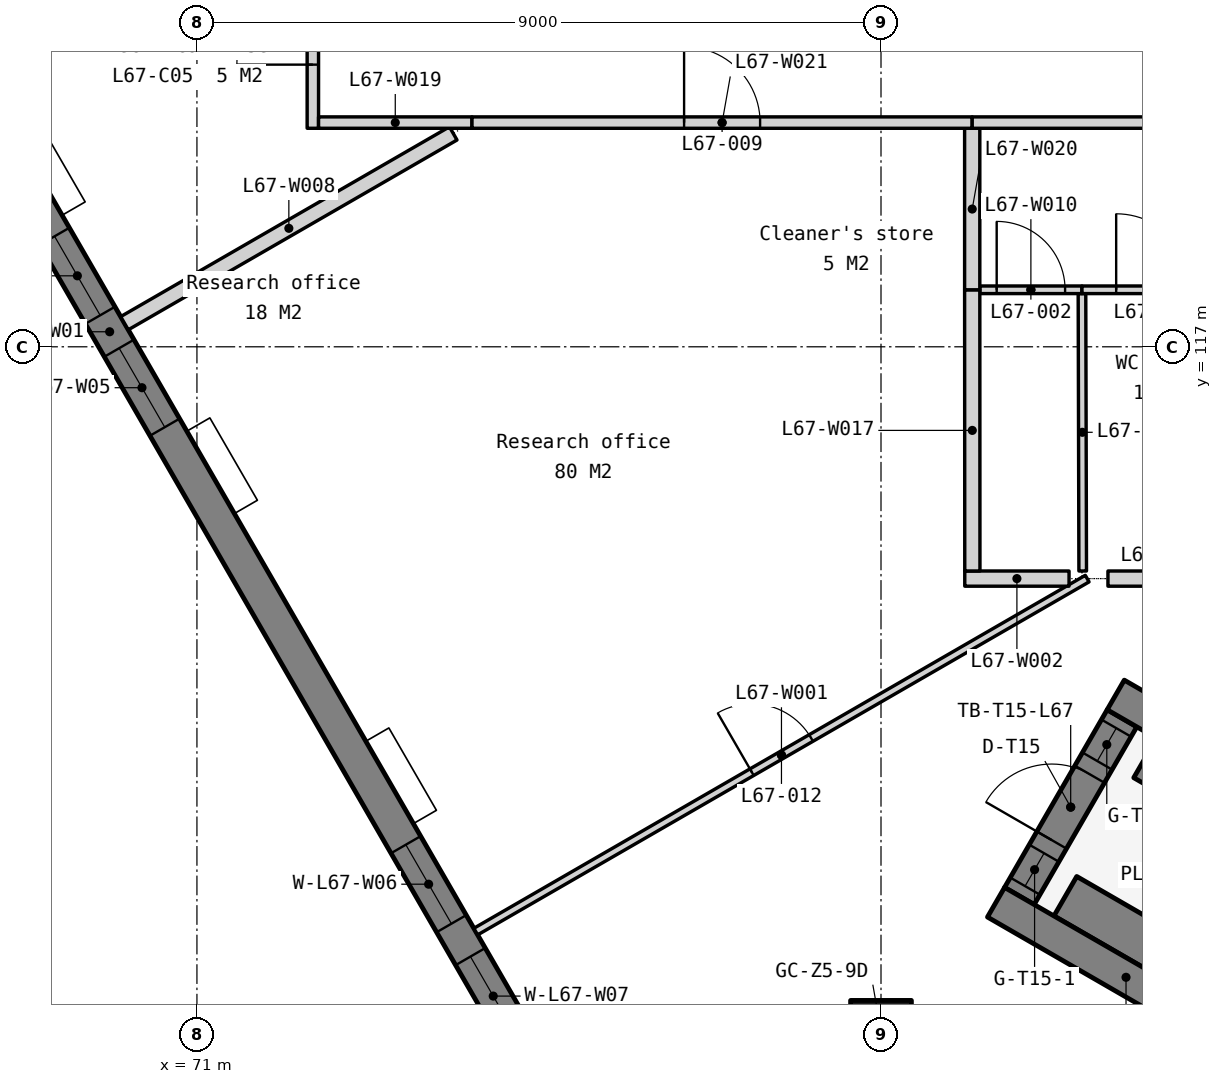
"""IFC4 building model, lengths in metres.
Left out: names, types, materials, properties, quantities, classifications, styles, units other than length and angle.
Written with IfcOpenShell. Run it as: python <this file> out.ifc"""

import sys

from ifc_helpers import new_model, si_unit, direction, frame, frame_2d, origin, origin_2d, place, context, subcontext, project, spatial, polyline, rectangle, outline, extrude, element, fill, save


model = new_model("IFC4")
c1 = context("Model", 3, precision=1e-05, world=origin(), true_north=direction((0.0, 1.0)))
c2 = subcontext(c1, "Body", "Model", "MODEL_VIEW")
j1 = project(units=[si_unit("LENGTHUNIT", "METRE"), si_unit("PLANEANGLEUNIT", "RADIAN")], contexts=[c1])
p1 = place(None, origin())
s1 = spatial("IfcSite", under=j1, at=p1, CompositionType="ELEMENT")
p2 = place(p1, origin())
s2 = spatial("IfcBuilding", under=s1, at=p2, CompositionType="ELEMENT")
p3 = place(p2, frame((0.0, 0.0, 273.8)))
s3 = spatial("IfcBuildingStorey", under=s2, at=p3, CompositionType="ELEMENT", Elevation=273.8)
p4 = place(p3, frame((80.0, 108.0, 0.0), z_axis=(0.0, 0.0, 1.0), x_axis=(1.0, 0.0, 0.0)))
e1 = element("IfcColumn", 1, at=p4, inside=s3, PredefinedType="COLUMN", context=c2, shape_type="SweptSolid", body=[
    extrude(rectangle(XDim=0.8, YDim=0.8, at=origin_2d()), origin(), (0.0, 0.0, 1.0), 3.9),
])
p5 = place(p3, frame((60.609, 133.207, -0.15), z_axis=(0.0, 0.0, 1.0), x_axis=(0.500002536638, -0.866023939251, 0.0)))
e2 = element("IfcWall", 2, at=p5, inside=s3, PredefinedType="SOLIDWALL", context=c2, shape_type="SweptSolid", body=[
    extrude(outline(polyline([(36.972, 0.0), (36.972, 3.9), (0.0, 3.9), (0.0, 0.0), (36.972, 0.0)])), frame((0.0, 0.225, 0.0), z_axis=(0.0, -1.0, 0.0), x_axis=(1.0, 0.0, 0.0)), (0.0, 0.0, 1.0), 0.45),
])
p6 = place(p5, frame((0.715, 0.0, 0.95)))
e3 = element("IfcOpeningElement", 3, at=p6, cuts=e2, PredefinedType="OPENING", context=c2, shape_type="SweptSolid", body=[
    extrude(rectangle(XDim=1.2, YDim=2.2, at=frame_2d((0.6, 1.1))), frame((0.0, 0.235, 0.0), z_axis=(0.0, -1.0, 0.0), x_axis=(1.0, 0.0, 0.0)), (0.0, 0.0, 1.0), 0.47),
])
p7 = place(p5, frame((7.793, 0.0, 0.95)))
e4 = element("IfcOpeningElement", 4, at=p7, cuts=e2, PredefinedType="OPENING", context=c2, shape_type="SweptSolid", body=[
    extrude(rectangle(XDim=1.2, YDim=2.2, at=frame_2d((0.6, 1.1))), frame((0.0, 0.235, 0.0), z_axis=(0.0, -1.0, 0.0), x_axis=(1.0, 0.0, 0.0)), (0.0, 0.0, 1.0), 0.47),
])
p8 = place(p5, frame((9.493, 0.0, 0.95)))
e5 = element("IfcOpeningElement", 5, at=p8, cuts=e2, PredefinedType="OPENING", context=c2, shape_type="SweptSolid", body=[
    extrude(rectangle(XDim=1.2, YDim=2.2, at=frame_2d((0.6, 1.1))), frame((0.0, 0.235, 0.0), z_axis=(0.0, -1.0, 0.0), x_axis=(1.0, 0.0, 0.0)), (0.0, 0.0, 1.0), 0.47),
])
p9 = place(p5, frame((17.036, 0.0, 0.95)))
e6 = element("IfcOpeningElement", 6, at=p9, cuts=e2, PredefinedType="OPENING", context=c2, shape_type="SweptSolid", body=[
    extrude(rectangle(XDim=1.2, YDim=2.2, at=frame_2d((0.6, 1.1))), frame((0.0, 0.235, 0.0), z_axis=(0.0, -1.0, 0.0), x_axis=(1.0, 0.0, 0.0)), (0.0, 0.0, 1.0), 0.47),
])
p10 = place(p5, frame((18.736, 0.0, 0.95)))
e7 = element("IfcOpeningElement", 7, at=p10, cuts=e2, PredefinedType="OPENING", context=c2, shape_type="SweptSolid", body=[
    extrude(rectangle(XDim=1.2, YDim=2.2, at=frame_2d((0.6, 1.1))), frame((0.0, 0.235, 0.0), z_axis=(0.0, -1.0, 0.0), x_axis=(1.0, 0.0, 0.0)), (0.0, 0.0, 1.0), 0.47),
])
p11 = place(p5, frame((26.279, 0.0, 0.95)))
e8 = element("IfcOpeningElement", 8, at=p11, cuts=e2, PredefinedType="OPENING", context=c2, shape_type="SweptSolid", body=[
    extrude(rectangle(XDim=1.2, YDim=2.2, at=frame_2d((0.6, 1.1))), frame((0.0, 0.235, 0.0), z_axis=(0.0, -1.0, 0.0), x_axis=(1.0, 0.0, 0.0)), (0.0, 0.0, 1.0), 0.47),
])
p12 = place(p5, frame((27.979, 0.0, 0.95)))
e9 = element("IfcOpeningElement", 9, at=p12, cuts=e2, PredefinedType="OPENING", context=c2, shape_type="SweptSolid", body=[
    extrude(rectangle(XDim=1.2, YDim=2.2, at=frame_2d((0.6, 1.1))), frame((0.0, 0.235, 0.0), z_axis=(0.0, -1.0, 0.0), x_axis=(1.0, 0.0, 0.0)), (0.0, 0.0, 1.0), 0.47),
])
p13 = place(p5, frame((35.058, 0.0, 0.95)))
e10 = element("IfcOpeningElement", 10, at=p13, cuts=e2, PredefinedType="OPENING", context=c2, shape_type="SweptSolid", body=[
    extrude(rectangle(XDim=1.2, YDim=2.2, at=frame_2d((0.6, 1.1))), frame((0.0, 0.235, 0.0), z_axis=(0.0, -1.0, 0.0), x_axis=(1.0, 0.0, 0.0)), (0.0, 0.0, 1.0), 0.47),
])
p14 = place(p3, frame((84.934, 107.717, 0.0), z_axis=(0.0, 0.0, 1.0), x_axis=(-0.866020906874, 0.500007788796, 0.0)))
e11 = element("IfcWall", 11, at=p14, inside=s3, PredefinedType="SOLIDWALL", context=c2, shape_type="SweptSolid", body=[
    extrude(rectangle(XDim=3.95, YDim=0.45, at=frame_2d((1.975, 0.0))), origin(), (0.0, 0.0, 1.0), 7.65),
])
p15 = place(p3, frame((86.509, 110.445, 0.0), z_axis=(0.0, 0.0, 1.0), x_axis=(-0.866047669374, 0.499961432884, 0.0)))
e12 = element("IfcWall", 12, at=p15, inside=s3, PredefinedType="SOLIDWALL", context=c2, shape_type="SweptSolid", body=[
    extrude(rectangle(XDim=3.95, YDim=0.45, at=frame_2d((1.975, 0.0))), origin(), (0.0, 0.0, 1.0), 7.65),
])
p16 = place(p3, frame((81.821, 109.774, -0.15), z_axis=(0.0, 0.0, 1.0), x_axis=(0.500048589285, 0.86599734893, 0.0)))
e13 = element("IfcWall", 13, at=p16, inside=s3, PredefinedType="SOLIDWALL", context=c2, shape_type="SweptSolid", body=[
    extrude(rectangle(XDim=2.7, YDim=0.45, at=frame_2d((1.35, 0.0))), origin(), (0.0, 0.0, 1.0), 3.9),
])
p17 = place(p16, frame((0.85, 0.0, 0.15)))
e14 = element("IfcOpeningElement", 14, at=p17, cuts=e13, PredefinedType="OPENING", context=c2, shape_type="SweptSolid", body=[
    extrude(rectangle(XDim=1.0, YDim=2.4, at=frame_2d((0.5, 1.2))), frame((0.0, 0.235, 0.0), z_axis=(0.0, -1.0, 0.0), x_axis=(1.0, 0.0, 0.0)), (0.0, 0.0, 1.0), 0.47),
])
p18 = place(p16, frame((0.15, 0.0, 0.15)))
e15 = element("IfcOpeningElement", 15, at=p18, cuts=e13, PredefinedType="OPENING", context=c2, shape_type="SweptSolid", body=[
    extrude(rectangle(XDim=0.5, YDim=2.4, at=frame_2d((0.25, 1.2))), frame((0.0, 0.235, 0.0), z_axis=(0.0, -1.0, 0.0), x_axis=(1.0, 0.0, 0.0)), (0.0, 0.0, 1.0), 0.47),
])
p19 = place(p16, frame((2.05, 0.0, 0.15)))
e16 = element("IfcOpeningElement", 16, at=p19, cuts=e13, PredefinedType="OPENING", context=c2, shape_type="SweptSolid", body=[
    extrude(rectangle(XDim=0.5, YDim=2.4, at=frame_2d((0.25, 1.2))), frame((0.0, 0.235, 0.0), z_axis=(0.0, -1.0, 0.0), x_axis=(1.0, 0.0, 0.0)), (0.0, 0.0, 1.0), 0.47),
])
for number, where, z_axis, x_axis in (
    (17, (84.763, 108.421, 0.0), (0.0, 0.0, 1.0), (-0.866, 0.5, 0.0)),
    (18, (85.813, 110.24, 0.0), (0.0, 0.0, 1.0), (-0.866, 0.5, 0.0)),
):
    element("IfcWall", number, at=place(p3, frame(where, z_axis=z_axis, x_axis=x_axis)), inside=s3, PredefinedType="STANDARD", context=c2, shape_type="SweptSolid", body=[
        extrude(rectangle(XDim=2.7, YDim=0.6, at=frame_2d((1.35, 0.0))), origin(), (0.0, 0.0, 1.0), 0.6),
    ])
p20 = place(p3, frame((74.668, 109.305, 0.0), z_axis=(0.0, 0.0, 1.0), x_axis=(0.866021891294, 0.500006083763, 0.0)))
e19 = element("IfcWall", 19, at=p20, inside=s3, PredefinedType="PARTITIONING", context=c2, shape_type="SweptSolid", body=[
    extrude(rectangle(XDim=9.289, YDim=0.1, at=frame_2d((4.645, 0.0))), origin(), (0.0, 0.0, 1.0), 3.75),
])
p21 = place(p20, frame((4.195, 0.0, 0.0)))
e20 = element("IfcOpeningElement", 20, at=p21, cuts=e19, PredefinedType="OPENING", context=c2, shape_type="SweptSolid", body=[
    extrude(rectangle(XDim=0.9, YDim=2.1, at=frame_2d((0.45, 1.05))), frame((0.0, 0.06, 0.0), z_axis=(0.0, -1.0, 0.0), x_axis=(1.0, 0.0, 0.0)), (0.0, 0.0, 1.0), 0.12),
])
p22 = place(p3, frame((81.102, 113.95, 0.0), z_axis=(0.0, 0.0, 1.0), x_axis=(1.0, 0.0, 0.0)))
e21 = element("IfcWall", 21, at=p22, inside=s3, PredefinedType="PARTITIONING", context=c2, shape_type="SweptSolid", body=[
    extrude(rectangle(XDim=1.372, YDim=0.2, at=frame_2d((0.686, 0.0))), origin(), (0.0, 0.0, 1.0), 3.75),
])
p23 = place(p3, frame((82.986, 113.95, 0.0), z_axis=(0.0, 0.0, 1.0), x_axis=(1.0, 0.0, 0.0)))
e22 = element("IfcWall", 22, at=p23, inside=s3, PredefinedType="PARTITIONING", context=c2, shape_type="SweptSolid", body=[
    extrude(rectangle(XDim=1.548, YDim=0.2, at=frame_2d((0.774, 0.0))), origin(), (0.0, 0.0, 1.0), 3.75),
])
p24 = place(p3, frame((70.047, 117.31, 0.0), z_axis=(0.0, 0.0, 1.0), x_axis=(0.866032544947, 0.499987630939, 0.0)))
e23 = element("IfcWall", 23, at=p24, inside=s3, PredefinedType="PARTITIONING", context=c2, shape_type="SweptSolid", body=[
    extrude(rectangle(XDim=4.994, YDim=0.2, at=frame_2d((2.497, 0.0))), origin(), (0.0, 0.0, 1.0), 3.75),
])
p25 = place(p3, frame((82.654, 114.05, 0.0), z_axis=(0.0, 0.0, 1.0), x_axis=(-0.002675575707, 0.999996420641, 0.0)))
e24 = element("IfcWall", 24, at=p25, inside=s3, PredefinedType="PARTITIONING", context=c2, shape_type="SweptSolid", body=[
    extrude(rectangle(XDim=3.65, YDim=0.1, at=frame_2d((1.825, 0.0))), origin(), (0.0, 0.0, 1.0), 3.75),
])
p26 = place(p3, frame((81.3, 117.75, 0.0), z_axis=(0.0, 0.0, 1.0), x_axis=(1.0, 0.0, 0.0)))
e25 = element("IfcWall", 25, at=p26, inside=s3, PredefinedType="PARTITIONING", context=c2, shape_type="SweptSolid", body=[
    extrude(rectangle(XDim=1.344, YDim=0.1, at=frame_2d((0.672, 0.0))), origin(), (0.0, 0.0, 1.0), 3.75),
])
p27 = place(p26, frame((0.222, 0.0, 0.0)))
e26 = element("IfcOpeningElement", 26, at=p27, cuts=e25, PredefinedType="OPENING", context=c2, shape_type="SweptSolid", body=[
    extrude(rectangle(XDim=0.9, YDim=2.1, at=frame_2d((0.45, 1.05))), frame((0.0, 0.06, 0.0), z_axis=(0.0, -1.0, 0.0), x_axis=(1.0, 0.0, 0.0)), (0.0, 0.0, 1.0), 0.12),
])
p28 = place(p3, frame((82.644, 117.75, 0.0), z_axis=(0.0, 0.0, 1.0), x_axis=(1.0, 0.0, 0.0)))
e27 = element("IfcWall", 27, at=p28, inside=s3, PredefinedType="PARTITIONING", context=c2, shape_type="SweptSolid", body=[
    extrude(rectangle(XDim=1.9, YDim=0.1, at=frame_2d((0.95, 0.0))), origin(), (0.0, 0.0, 1.0), 3.75),
])
p29 = place(p28, frame((0.45, 0.0, 0.0)))
e28 = element("IfcOpeningElement", 28, at=p29, cuts=e27, PredefinedType="OPENING", context=c2, shape_type="SweptSolid", body=[
    extrude(rectangle(XDim=1.0, YDim=2.1, at=frame_2d((0.5, 1.05))), frame((0.0, 0.06, 0.0), z_axis=(0.0, -1.0, 0.0), x_axis=(1.0, 0.0, 0.0)), (0.0, 0.0, 1.0), 0.12),
])
p30 = place(p3, frame((81.2, 117.75, 0.0), z_axis=(0.0, 0.0, 1.0), x_axis=(0.000527878514, -0.999999860672, 0.0)))
e29 = element("IfcWall", 29, at=p30, inside=s3, PredefinedType="PARTITIONING", context=c2, shape_type="SweptSolid", body=[
    extrude(rectangle(XDim=3.7, YDim=0.2, at=frame_2d((1.85, 0.0))), origin(), (0.0, 0.0, 1.0), 3.75),
])
p31 = place(p3, frame((72.525, 119.875, 0.0), z_axis=(0.0, 0.0, 1.0), x_axis=(0.0, 1.0, 0.0)))
e30 = element("IfcWall", 30, at=p31, inside=s3, PredefinedType="PARTITIONING", context=c2, shape_type="SweptSolid", body=[
    extrude(rectangle(XDim=2.675, YDim=0.15, at=frame_2d((1.337, 0.0))), origin(), (0.0, 0.0, 1.0), 3.75),
])
p32 = place(p31, frame((0.837, 0.0, 0.0)))
e31 = element("IfcOpeningElement", 31, at=p32, cuts=e30, PredefinedType="OPENING", context=c2, shape_type="SweptSolid", body=[
    extrude(rectangle(XDim=1.0, YDim=2.1, at=frame_2d((0.5, 1.05))), frame((0.0, 0.085, 0.0), z_axis=(0.0, -1.0, 0.0), x_axis=(1.0, 0.0, 0.0)), (0.0, 0.0, 1.0), 0.17),
])
p33 = place(p3, frame((72.6, 119.95, 0.0), z_axis=(0.0, 0.0, 1.0), x_axis=(1.0, 0.0, 0.0)))
e32 = element("IfcWall", 32, at=p33, inside=s3, PredefinedType="PARTITIONING", context=c2, shape_type="SweptSolid", body=[
    extrude(rectangle(XDim=2.019, YDim=0.15, at=frame_2d((1.009, 0.0))), origin(), (0.0, 0.0, 1.0), 3.75),
])
p34 = place(p3, frame((81.2, 117.75, 0.0), z_axis=(0.0, 0.0, 1.0), x_axis=(0.0, 1.0, 0.0)))
e33 = element("IfcWall", 33, at=p34, inside=s3, PredefinedType="PARTITIONING", context=c2, shape_type="SweptSolid", body=[
    extrude(rectangle(XDim=2.125, YDim=0.2, at=frame_2d((1.062, 0.0))), origin(), (0.0, 0.0, 1.0), 3.75),
])
p35 = place(p3, frame((74.619, 119.95, 0.0), z_axis=(0.0, 0.0, 1.0), x_axis=(1.0, 0.0, 0.0)))
e34 = element("IfcWall", 34, at=p35, inside=s3, PredefinedType="PARTITIONING", context=c2, shape_type="SweptSolid", body=[
    extrude(rectangle(XDim=6.581, YDim=0.15, at=frame_2d((3.291, 0.0))), origin(), (0.0, 0.0, 1.0), 3.75),
])
p36 = place(p35, frame((2.791, 0.0, 0.0)))
e35 = element("IfcOpeningElement", 35, at=p36, cuts=e34, PredefinedType="OPENING", context=c2, shape_type="SweptSolid", body=[
    extrude(rectangle(XDim=1.0, YDim=2.1, at=frame_2d((0.5, 1.05))), frame((0.0, 0.085, 0.0), z_axis=(0.0, -1.0, 0.0), x_axis=(1.0, 0.0, 0.0)), (0.0, 0.0, 1.0), 0.17),
])
p37 = place(p3, frame((81.2, 119.95, 0.0), z_axis=(0.0, 0.0, 1.0), x_axis=(1.0, 0.0, 0.0)))
e36 = element("IfcWall", 36, at=p37, inside=s3, PredefinedType="PARTITIONING", context=c2, shape_type="SweptSolid", body=[
    extrude(rectangle(XDim=6.275, YDim=0.15, at=frame_2d((3.137, 0.0))), origin(), (0.0, 0.0, 1.0), 3.75),
])
p38 = place(p37, frame((2.637, 0.0, 0.0)))
e37 = element("IfcOpeningElement", 37, at=p38, cuts=e36, PredefinedType="OPENING", context=c2, shape_type="SweptSolid", body=[
    extrude(rectangle(XDim=1.0, YDim=2.1, at=frame_2d((0.5, 1.05))), frame((0.0, 0.085, 0.0), z_axis=(0.0, -1.0, 0.0), x_axis=(1.0, 0.0, 0.0)), (0.0, 0.0, 1.0), 0.17),
])
p39 = place(p9, origin())
e38 = element("IfcWindow", 38, at=p39, inside=s3, PartitioningType="SINGLE_PANEL", PredefinedType="WINDOW", context=c2, shape_type="SweptSolid", body=[
    extrude(rectangle(XDim=1.2, YDim=2.2, at=frame_2d((0.6, 1.1))), frame((0.0, 0.03, 0.0), z_axis=(0.0, -1.0, 0.0), x_axis=(1.0, 0.0, 0.0)), (0.0, 0.0, 1.0), 0.06),
])
fill(e6, e38)
p40 = place(p10, origin())
e39 = element("IfcWindow", 39, at=p40, inside=s3, PartitioningType="SINGLE_PANEL", PredefinedType="WINDOW", context=c2, shape_type="SweptSolid", body=[
    extrude(rectangle(XDim=1.2, YDim=2.2, at=frame_2d((0.6, 1.1))), frame((0.0, 0.03, 0.0), z_axis=(0.0, -1.0, 0.0), x_axis=(1.0, 0.0, 0.0)), (0.0, 0.0, 1.0), 0.06),
])
fill(e7, e39)
p41 = place(p11, origin())
e40 = element("IfcWindow", 40, at=p41, inside=s3, PartitioningType="SINGLE_PANEL", PredefinedType="WINDOW", context=c2, shape_type="SweptSolid", body=[
    extrude(rectangle(XDim=1.2, YDim=2.2, at=frame_2d((0.6, 1.1))), frame((0.0, 0.03, 0.0), z_axis=(0.0, -1.0, 0.0), x_axis=(1.0, 0.0, 0.0)), (0.0, 0.0, 1.0), 0.06),
])
fill(e8, e40)
p42 = place(p12, origin())
e41 = element("IfcWindow", 41, at=p42, inside=s3, PartitioningType="SINGLE_PANEL", PredefinedType="WINDOW", context=c2, shape_type="SweptSolid", body=[
    extrude(rectangle(XDim=1.2, YDim=2.2, at=frame_2d((0.6, 1.1))), frame((0.0, 0.03, 0.0), z_axis=(0.0, -1.0, 0.0), x_axis=(1.0, 0.0, 0.0)), (0.0, 0.0, 1.0), 0.06),
])
fill(e9, e41)
p43 = place(p17, origin())
e42 = element("IfcDoor", 42, at=p43, inside=s3, OperationType="SINGLE_SWING_LEFT", PredefinedType="DOOR", context=c2, shape_type="SweptSolid", body=[
    extrude(rectangle(XDim=1.0, YDim=2.4, at=frame_2d((0.5, 1.2))), frame((0.0, 0.025, 0.0), z_axis=(0.0, -1.0, 0.0), x_axis=(1.0, 0.0, 0.0)), (0.0, 0.0, 1.0), 0.05),
])
fill(e14, e42)
p44 = place(p18, origin())
e43 = element("IfcWindow", 43, at=p44, inside=s3, PartitioningType="SINGLE_PANEL", PredefinedType="WINDOW", context=c2, shape_type="SweptSolid", body=[
    extrude(rectangle(XDim=0.5, YDim=2.4, at=frame_2d((0.25, 1.2))), frame((0.0, 0.03, 0.0), z_axis=(0.0, -1.0, 0.0), x_axis=(1.0, 0.0, 0.0)), (0.0, 0.0, 1.0), 0.06),
])
fill(e15, e43)
p45 = place(p19, origin())
e44 = element("IfcWindow", 44, at=p45, inside=s3, PartitioningType="SINGLE_PANEL", PredefinedType="WINDOW", context=c2, shape_type="SweptSolid", body=[
    extrude(rectangle(XDim=0.5, YDim=2.4, at=frame_2d((0.25, 1.2))), frame((0.0, 0.03, 0.0), z_axis=(0.0, -1.0, 0.0), x_axis=(1.0, 0.0, 0.0)), (0.0, 0.0, 1.0), 0.06),
])
fill(e16, e44)
p46 = place(p27, origin())
e45 = element("IfcDoor", 45, at=p46, inside=s3, OperationType="SINGLE_SWING_LEFT", PredefinedType="DOOR", context=c2, shape_type="SweptSolid", body=[
    extrude(rectangle(XDim=0.9, YDim=2.1, at=frame_2d((0.45, 1.05))), frame((0.0, 0.025, 0.0), z_axis=(0.0, -1.0, 0.0), x_axis=(1.0, 0.0, 0.0)), (0.0, 0.0, 1.0), 0.05),
])
fill(e26, e45)
p47 = place(p29, origin())
e46 = element("IfcDoor", 46, at=p47, inside=s3, OperationType="SINGLE_SWING_LEFT", PredefinedType="DOOR", context=c2, shape_type="SweptSolid", body=[
    extrude(rectangle(XDim=1.0, YDim=2.1, at=frame_2d((0.5, 1.05))), frame((0.0, 0.025, 0.0), z_axis=(0.0, -1.0, 0.0), x_axis=(1.0, 0.0, 0.0)), (0.0, 0.0, 1.0), 0.05),
])
fill(e28, e46)
p48 = place(p32, origin())
e47 = element("IfcDoor", 47, at=p48, inside=s3, OperationType="SINGLE_SWING_LEFT", PredefinedType="DOOR", context=c2, shape_type="SweptSolid", body=[
    extrude(rectangle(XDim=1.0, YDim=2.1, at=frame_2d((0.5, 1.05))), frame((0.0, 0.025, 0.0), z_axis=(0.0, -1.0, 0.0), x_axis=(1.0, 0.0, 0.0)), (0.0, 0.0, 1.0), 0.05),
])
fill(e31, e47)
p49 = place(p36, origin())
e48 = element("IfcDoor", 48, at=p49, inside=s3, OperationType="SINGLE_SWING_LEFT", PredefinedType="DOOR", context=c2, shape_type="SweptSolid", body=[
    extrude(rectangle(XDim=1.0, YDim=2.1, at=frame_2d((0.5, 1.05))), frame((0.0, 0.025, 0.0), z_axis=(0.0, -1.0, 0.0), x_axis=(1.0, 0.0, 0.0)), (0.0, 0.0, 1.0), 0.05),
])
fill(e35, e48)
p50 = place(p21, origin())
e49 = element("IfcDoor", 49, at=p50, inside=s3, OperationType="SINGLE_SWING_LEFT", PredefinedType="DOOR", context=c2, shape_type="SweptSolid", body=[
    extrude(rectangle(XDim=0.9, YDim=2.1, at=frame_2d((0.45, 1.05))), frame((0.0, 0.025, 0.0), z_axis=(0.0, -1.0, 0.0), x_axis=(1.0, 0.0, 0.0)), (0.0, 0.0, 1.0), 0.05),
])
fill(e20, e49)
save(model, sys.argv[1])
